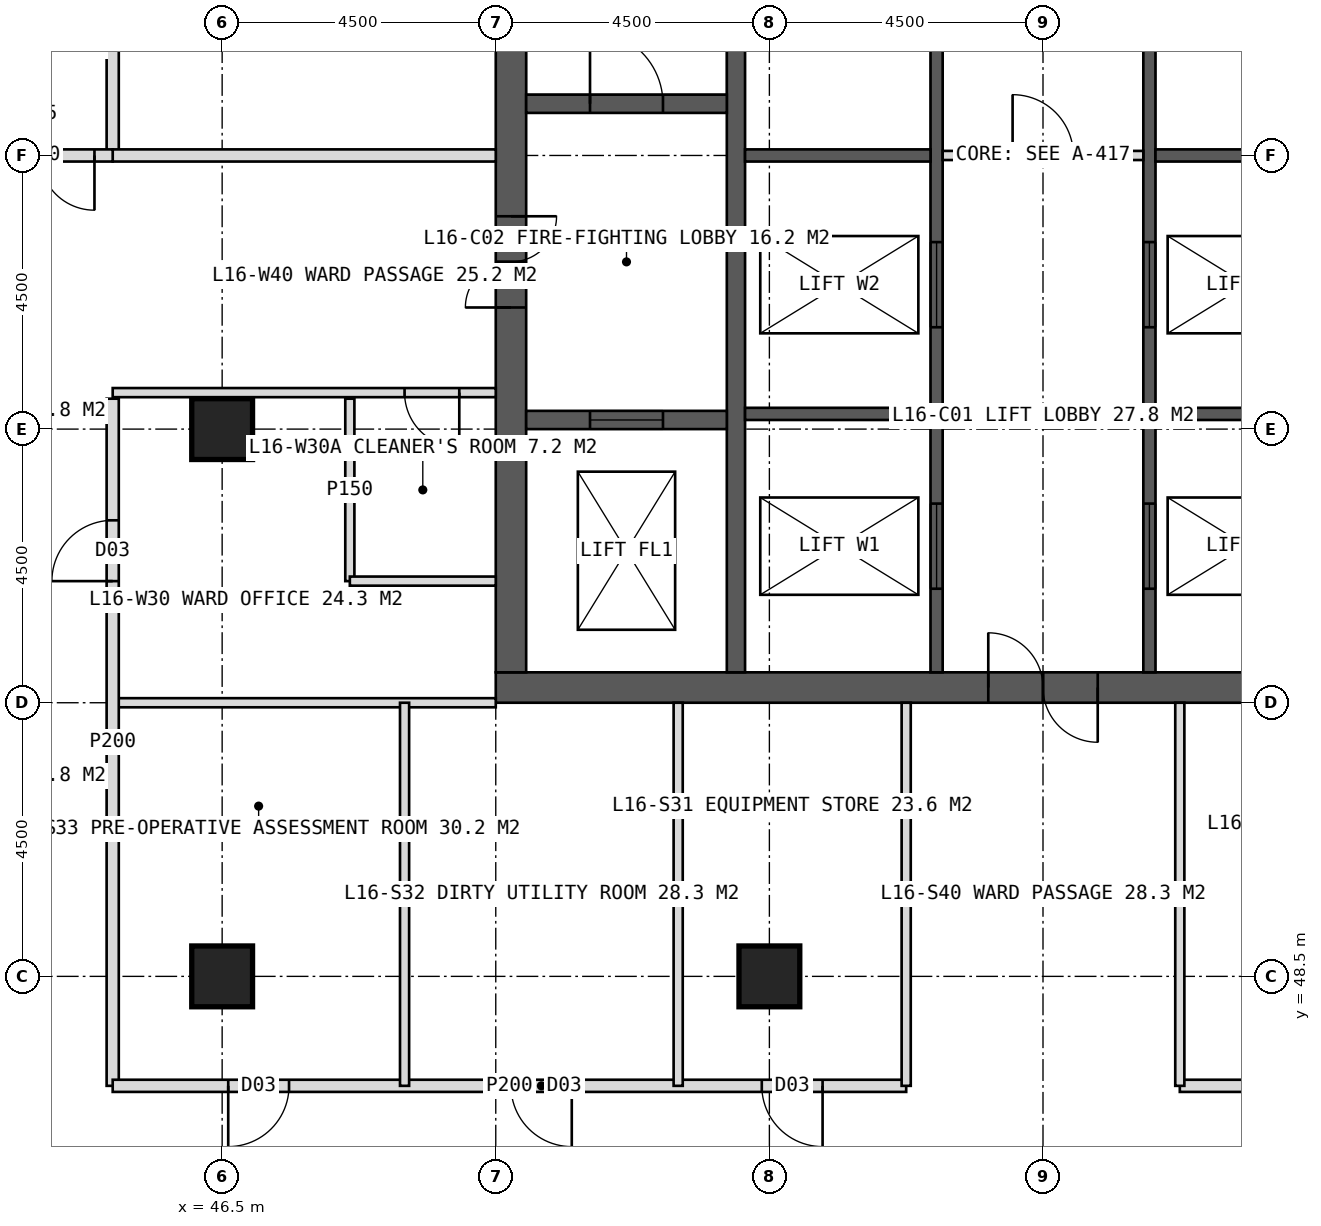
"""IFC4 building model, lengths in metres.
Left out: names, types, materials, properties, quantities, classifications, styles, units other than length and angle.
Written with IfcOpenShell. Run it as: python <this file> out.ifc"""

import sys

from ifc_helpers import new_model, si_unit, direction, frame, frame_2d, origin, origin_2d, place, context, subcontext, project, spatial, rectangle, hollow_rectangle, extrude, element, fill, save


model = new_model("IFC4")
c1 = context("Model", 3, precision=1e-05, world=origin(), true_north=direction((0.0, 1.0)))
c2 = subcontext(c1, "Body", "Model", "MODEL_VIEW")
j1 = project(units=[si_unit("LENGTHUNIT", "METRE"), si_unit("PLANEANGLEUNIT", "RADIAN")], contexts=[c1])
p1 = place(None, origin())
s1 = spatial("IfcSite", under=j1, at=p1, CompositionType="ELEMENT")
p2 = place(p1, origin())
s2 = spatial("IfcBuilding", under=s1, at=p2, CompositionType="ELEMENT")
p3 = place(p2, frame((0.0, 0.0, 71.0)))
s3 = spatial("IfcBuildingStorey", under=s2, at=p3, CompositionType="ELEMENT", Elevation=71.0)
p4 = place(p3, frame((51.0, 53.25, 0.0), z_axis=(0.0, 0.0, 1.0), x_axis=(1.0, 0.0, 0.0)))
e1 = element("IfcWall", 1, at=p4, inside=s3, PredefinedType="SHEAR", context=c2, shape_type="SweptSolid", body=[
    extrude(rectangle(XDim=18.0, YDim=0.5, at=frame_2d((9.0, 0.0))), origin(), (0.0, 0.0, 1.0), 4.0),
])
p5 = place(p4, frame((8.1, 0.0, 0.0)))
e2 = element("IfcOpeningElement", 2, at=p5, cuts=e1, PredefinedType="OPENING", context=c2, shape_type="SweptSolid", body=[
    extrude(rectangle(XDim=1.8, YDim=2.2, at=frame_2d((0.9, 1.1))), frame((0.0, 0.26, 0.0), z_axis=(0.0, -1.0, 0.0), x_axis=(1.0, 0.0, 0.0)), (0.0, 0.0, 1.0), 0.52),
])
p6 = place(p3, frame((51.25, 53.5, 0.0), z_axis=(0.0, 0.0, 1.0), x_axis=(0.0, 1.0, 0.0)))
e3 = element("IfcWall", 3, at=p6, inside=s3, PredefinedType="SHEAR", context=c2, shape_type="SweptSolid", body=[
    extrude(rectangle(XDim=17.0, YDim=0.5, at=frame_2d((8.5, 0.0))), origin(), (0.0, 0.0, 1.0), 4.0),
])
p7 = place(p6, frame((6.0, 0.0, 0.0)))
e4 = element("IfcOpeningElement", 4, at=p7, cuts=e3, PredefinedType="OPENING", context=c2, shape_type="SweptSolid", body=[
    extrude(rectangle(XDim=1.5, YDim=2.2, at=frame_2d((0.75, 1.1))), frame((0.0, 0.26, 0.0), z_axis=(0.0, -1.0, 0.0), x_axis=(1.0, 0.0, 0.0)), (0.0, 0.0, 1.0), 0.52),
])
p8 = place(p3, frame((54.95, 53.5, 0.0), z_axis=(0.0, 0.0, 1.0), x_axis=(0.0, 1.0, 0.0)))
e5 = element("IfcWall", 5, at=p8, inside=s3, PredefinedType="SHEAR", context=c2, shape_type="SweptSolid", body=[
    extrude(rectangle(XDim=17.0, YDim=0.3, at=frame_2d((8.5, 0.0))), origin(), (0.0, 0.0, 1.0), 4.0),
])
p9 = place(p3, frame((58.25, 53.5, 0.0), z_axis=(0.0, 0.0, 1.0), x_axis=(0.0, 1.0, 0.0)))
e6 = element("IfcWall", 6, at=p9, inside=s3, PredefinedType="SHEAR", context=c2, shape_type="SweptSolid", body=[
    extrude(rectangle(XDim=17.0, YDim=0.2, at=frame_2d((8.5, 0.0))), origin(), (0.0, 0.0, 1.0), 4.0),
])
p10 = place(p9, frame((1.375, 0.0, 0.0)))
e7 = element("IfcOpeningElement", 7, at=p10, cuts=e6, PredefinedType="OPENING", context=c2, shape_type="SweptSolid", body=[
    extrude(rectangle(XDim=1.4, YDim=2.2, at=frame_2d((0.7, 1.1))), frame((0.0, 0.11, 0.0), z_axis=(0.0, -1.0, 0.0), x_axis=(1.0, 0.0, 0.0)), (0.0, 0.0, 1.0), 0.22),
])
p11 = place(p9, frame((5.675, 0.0, 0.0)))
e8 = element("IfcOpeningElement", 8, at=p11, cuts=e6, PredefinedType="OPENING", context=c2, shape_type="SweptSolid", body=[
    extrude(rectangle(XDim=1.4, YDim=2.2, at=frame_2d((0.7, 1.1))), frame((0.0, 0.11, 0.0), z_axis=(0.0, -1.0, 0.0), x_axis=(1.0, 0.0, 0.0)), (0.0, 0.0, 1.0), 0.22),
])
p12 = place(p3, frame((61.75, 53.5, 0.0), z_axis=(0.0, 0.0, 1.0), x_axis=(0.0, 1.0, 0.0)))
e9 = element("IfcWall", 9, at=p12, inside=s3, PredefinedType="SHEAR", context=c2, shape_type="SweptSolid", body=[
    extrude(rectangle(XDim=17.0, YDim=0.2, at=frame_2d((8.5, 0.0))), origin(), (0.0, 0.0, 1.0), 4.0),
])
p13 = place(p12, frame((1.375, 0.0, 0.0)))
e10 = element("IfcOpeningElement", 10, at=p13, cuts=e9, PredefinedType="OPENING", context=c2, shape_type="SweptSolid", body=[
    extrude(rectangle(XDim=1.4, YDim=2.2, at=frame_2d((0.7, 1.1))), frame((0.0, 0.11, 0.0), z_axis=(0.0, -1.0, 0.0), x_axis=(1.0, 0.0, 0.0)), (0.0, 0.0, 1.0), 0.22),
])
p14 = place(p12, frame((5.675, 0.0, 0.0)))
e11 = element("IfcOpeningElement", 11, at=p14, cuts=e9, PredefinedType="OPENING", context=c2, shape_type="SweptSolid", body=[
    extrude(rectangle(XDim=1.4, YDim=2.2, at=frame_2d((0.7, 1.1))), frame((0.0, 0.11, 0.0), z_axis=(0.0, -1.0, 0.0), x_axis=(1.0, 0.0, 0.0)), (0.0, 0.0, 1.0), 0.22),
])
for number, where, z_axis, x_axis in (
    (12, (55.1, 57.75, 0.0), (0.0, 0.0, 1.0), (1.0, 0.0, 0.0)),
    (13, (61.85, 57.75, 0.0), (0.0, 0.0, 1.0), (1.0, 0.0, 0.0)),
    (14, (55.1, 62.0, 0.0), (0.0, 0.0, 1.0), (1.0, 0.0, 0.0)),
    (15, (61.85, 62.0, 0.0), (0.0, 0.0, 1.0), (1.0, 0.0, 0.0)),
):
    element("IfcWall", number, at=place(p3, frame(where, z_axis=z_axis, x_axis=x_axis)), inside=s3, PredefinedType="SHEAR", context=c2, shape_type="SweptSolid", body=[
        extrude(rectangle(XDim=3.05, YDim=0.2, at=frame_2d((1.525, 0.0))), origin(), (0.0, 0.0, 1.0), 4.0),
    ])
p15 = place(p3, frame((51.5, 62.85, 0.0), z_axis=(0.0, 0.0, 1.0), x_axis=(1.0, 0.0, 0.0)))
e16 = element("IfcWall", 16, at=p15, inside=s3, PredefinedType="SHEAR", context=c2, shape_type="SweptSolid", body=[
    extrude(rectangle(XDim=3.3, YDim=0.3, at=frame_2d((1.65, 0.0))), origin(), (0.0, 0.0, 1.0), 4.0),
])
p16 = place(p15, frame((1.05, 0.0, 0.0)))
e17 = element("IfcOpeningElement", 17, at=p16, cuts=e16, PredefinedType="OPENING", context=c2, shape_type="SweptSolid", body=[
    extrude(rectangle(XDim=1.2, YDim=2.1, at=frame_2d((0.6, 1.05))), frame((0.0, 0.16, 0.0), z_axis=(0.0, -1.0, 0.0), x_axis=(1.0, 0.0, 0.0)), (0.0, 0.0, 1.0), 0.32),
])
p17 = place(p3, frame((51.5, 57.65, 0.0), z_axis=(0.0, 0.0, 1.0), x_axis=(1.0, 0.0, 0.0)))
e18 = element("IfcWall", 18, at=p17, inside=s3, PredefinedType="SHEAR", context=c2, shape_type="SweptSolid", body=[
    extrude(rectangle(XDim=3.3, YDim=0.3, at=frame_2d((1.65, 0.0))), origin(), (0.0, 0.0, 1.0), 4.0),
])
p18 = place(p17, frame((1.05, 0.0, 0.0)))
e19 = element("IfcOpeningElement", 19, at=p18, cuts=e18, PredefinedType="OPENING", context=c2, shape_type="SweptSolid", body=[
    extrude(rectangle(XDim=1.2, YDim=2.2, at=frame_2d((0.6, 1.1))), frame((0.0, 0.16, 0.0), z_axis=(0.0, -1.0, 0.0), x_axis=(1.0, 0.0, 0.0)), (0.0, 0.0, 1.0), 0.32),
])
for number, where, z_axis, x_axis in (
    (20, (46.5, 48.5, 0.0), (0.0, 0.0, 1.0), (1.0, 0.0, 0.0)),
    (21, (55.5, 48.5, 0.0), (0.0, 0.0, 1.0), (1.0, 0.0, 0.0)),
    (22, (46.5, 57.5, 0.0), (0.0, 0.0, 1.0), (1.0, 0.0, 0.0)),
):
    element("IfcColumn", number, at=place(p3, frame(where, z_axis=z_axis, x_axis=x_axis)), inside=s3, PredefinedType="COLUMN", context=c2, shape_type="SweptSolid", body=[
        extrude(hollow_rectangle(XDim=1.0, YDim=1.0, WallThickness=0.1, at=origin_2d()), origin(), (0.0, 0.0, 1.0), 4.0),
    ])
p19 = place(p3, frame((51.0, 53.0, 0.0), z_axis=(0.0, 0.0, 1.0), x_axis=(-1.0, 0.0, 0.0)))
e23 = element("IfcWall", 23, at=p19, inside=s3, PredefinedType="PARTITIONING", context=c2, shape_type="SweptSolid", body=[
    extrude(rectangle(XDim=6.3, YDim=0.15, at=frame_2d((3.15, 0.0))), origin(), (0.0, 0.0, 1.0), 3.75),
])
p20 = place(p3, frame((44.7, 46.7, 0.0), z_axis=(0.0, 0.0, 1.0), x_axis=(0.0, 1.0, 0.0)))
e24 = element("IfcWall", 24, at=p20, inside=s3, PredefinedType="PARTITIONING", context=c2, shape_type="SweptSolid", body=[
    extrude(rectangle(XDim=11.3, YDim=0.2, at=frame_2d((5.65, 0.0))), origin(), (0.0, 0.0, 1.0), 3.75),
])
p21 = place(p20, frame((8.3, 0.0, 0.0)))
e25 = element("IfcOpeningElement", 25, at=p21, cuts=e24, PredefinedType="OPENING", context=c2, shape_type="SweptSolid", body=[
    extrude(rectangle(XDim=1.0, YDim=2.1, at=frame_2d((0.5, 1.05))), frame((0.0, 0.11, 0.0), z_axis=(0.0, -1.0, 0.0), x_axis=(1.0, 0.0, 0.0)), (0.0, 0.0, 1.0), 0.22),
])
p22 = place(p3, frame((44.7, 62.0, 0.0), z_axis=(0.0, 0.0, 1.0), x_axis=(0.0, 1.0, 0.0)))
e26 = element("IfcWall", 26, at=p22, inside=s3, PredefinedType="PARTITIONING", context=c2, shape_type="SweptSolid", body=[
    extrude(rectangle(XDim=15.3, YDim=0.2, at=frame_2d((7.65, 0.0))), origin(), (0.0, 0.0, 1.0), 3.75),
])
p23 = place(p22, frame((3.25, 0.0, 0.0)))
e27 = element("IfcOpeningElement", 27, at=p23, cuts=e26, PredefinedType="OPENING", context=c2, shape_type="SweptSolid", body=[
    extrude(rectangle(XDim=1.0, YDim=2.1, at=frame_2d((0.5, 1.05))), frame((0.0, 0.11, 0.0), z_axis=(0.0, -1.0, 0.0), x_axis=(1.0, 0.0, 0.0)), (0.0, 0.0, 1.0), 0.22),
])
p24 = place(p22, frame((9.25, 0.0, 0.0)))
e28 = element("IfcOpeningElement", 28, at=p24, cuts=e26, PredefinedType="OPENING", context=c2, shape_type="SweptSolid", body=[
    extrude(rectangle(XDim=1.0, YDim=2.1, at=frame_2d((0.5, 1.05))), frame((0.0, 0.11, 0.0), z_axis=(0.0, -1.0, 0.0), x_axis=(1.0, 0.0, 0.0)), (0.0, 0.0, 1.0), 0.22),
])
p25 = place(p22, frame((13.15, 0.0, 0.0)))
e29 = element("IfcOpeningElement", 29, at=p25, cuts=e26, PredefinedType="OPENING", context=c2, shape_type="SweptSolid", body=[
    extrude(rectangle(XDim=1.0, YDim=2.1, at=frame_2d((0.5, 1.05))), frame((0.0, 0.11, 0.0), z_axis=(0.0, -1.0, 0.0), x_axis=(1.0, 0.0, 0.0)), (0.0, 0.0, 1.0), 0.22),
])
p26 = place(p3, frame((51.0, 58.1, 0.0), z_axis=(0.0, 0.0, 1.0), x_axis=(-1.0, 0.0, 0.0)))
e30 = element("IfcWall", 30, at=p26, inside=s3, PredefinedType="PARTITIONING", context=c2, shape_type="SweptSolid", body=[
    extrude(rectangle(XDim=6.3, YDim=0.15, at=frame_2d((3.15, 0.0))), origin(), (0.0, 0.0, 1.0), 3.75),
])
p27 = place(p26, frame((0.6, 0.0, 0.0)))
e31 = element("IfcOpeningElement", 31, at=p27, cuts=e30, PredefinedType="OPENING", context=c2, shape_type="SweptSolid", body=[
    extrude(rectangle(XDim=0.9, YDim=2.1, at=frame_2d((0.45, 1.05))), frame((0.0, 0.085, 0.0), z_axis=(0.0, -1.0, 0.0), x_axis=(1.0, 0.0, 0.0)), (0.0, 0.0, 1.0), 0.17),
])
p28 = place(p3, frame((51.0, 62.0, 0.0), z_axis=(0.0, 0.0, 1.0), x_axis=(-1.0, 0.0, 0.0)))
e32 = element("IfcWall", 32, at=p28, inside=s3, PredefinedType="SOLIDWALL", context=c2, shape_type="SweptSolid", body=[
    extrude(rectangle(XDim=6.3, YDim=0.2, at=frame_2d((3.15, 0.0))), origin(), (0.0, 0.0, 1.0), 2.75),
])
p29 = place(p3, frame((48.6, 55.0, 0.0), z_axis=(0.0, 0.0, 1.0), x_axis=(0.0, 1.0, 0.0)))
e33 = element("IfcWall", 33, at=p29, inside=s3, PredefinedType="PARTITIONING", context=c2, shape_type="SweptSolid", body=[
    extrude(rectangle(XDim=3.0, YDim=0.15, at=frame_2d((1.5, 0.0))), origin(), (0.0, 0.0, 1.0), 3.75),
])
p30 = place(p3, frame((51.0, 55.0, 0.0), z_axis=(0.0, 0.0, 1.0), x_axis=(-1.0, 0.0, 0.0)))
e34 = element("IfcWall", 34, at=p30, inside=s3, PredefinedType="PARTITIONING", context=c2, shape_type="SweptSolid", body=[
    extrude(rectangle(XDim=2.4, YDim=0.15, at=frame_2d((1.2, 0.0))), origin(), (0.0, 0.0, 1.0), 3.75),
])
p31 = place(p3, frame((75.3, 46.7, 0.0), z_axis=(0.0, 0.0, 1.0), x_axis=(-1.0, 0.0, 0.0)))
e35 = element("IfcWall", 35, at=p31, inside=s3, PredefinedType="PARTITIONING", context=c2, shape_type="SweptSolid", body=[
    extrude(rectangle(XDim=13.05, YDim=0.2, at=frame_2d((6.525, 0.0))), origin(), (0.0, 0.0, 1.0), 3.75),
])
p32 = place(p31, frame((9.175, 0.0, 0.0)))
e36 = element("IfcOpeningElement", 36, at=p32, cuts=e35, PredefinedType="OPENING", context=c2, shape_type="SweptSolid", body=[
    extrude(rectangle(XDim=1.0, YDim=2.1, at=frame_2d((0.5, 1.05))), frame((0.0, 0.11, 0.0), z_axis=(0.0, -1.0, 0.0), x_axis=(1.0, 0.0, 0.0)), (0.0, 0.0, 1.0), 0.22),
])
p33 = place(p3, frame((57.75, 46.7, 0.0), z_axis=(0.0, 0.0, 1.0), x_axis=(-1.0, 0.0, 0.0)))
e37 = element("IfcWall", 37, at=p33, inside=s3, PredefinedType="PARTITIONING", context=c2, shape_type="SweptSolid", body=[
    extrude(rectangle(XDim=13.05, YDim=0.2, at=frame_2d((6.525, 0.0))), origin(), (0.0, 0.0, 1.0), 3.75),
])
p34 = place(p33, frame((1.375, 0.0, 0.0)))
e38 = element("IfcOpeningElement", 38, at=p34, cuts=e37, PredefinedType="OPENING", context=c2, shape_type="SweptSolid", body=[
    extrude(rectangle(XDim=1.0, YDim=2.1, at=frame_2d((0.5, 1.05))), frame((0.0, 0.11, 0.0), z_axis=(0.0, -1.0, 0.0), x_axis=(1.0, 0.0, 0.0)), (0.0, 0.0, 1.0), 0.22),
])
p35 = place(p33, frame((5.5, 0.0, 0.0)))
e39 = element("IfcOpeningElement", 39, at=p35, cuts=e37, PredefinedType="OPENING", context=c2, shape_type="SweptSolid", body=[
    extrude(rectangle(XDim=1.0, YDim=2.1, at=frame_2d((0.5, 1.05))), frame((0.0, 0.11, 0.0), z_axis=(0.0, -1.0, 0.0), x_axis=(1.0, 0.0, 0.0)), (0.0, 0.0, 1.0), 0.22),
])
p36 = place(p33, frame((10.15, 0.0, 0.0)))
e40 = element("IfcOpeningElement", 40, at=p36, cuts=e37, PredefinedType="OPENING", context=c2, shape_type="SweptSolid", body=[
    extrude(rectangle(XDim=1.0, YDim=2.1, at=frame_2d((0.5, 1.05))), frame((0.0, 0.11, 0.0), z_axis=(0.0, -1.0, 0.0), x_axis=(1.0, 0.0, 0.0)), (0.0, 0.0, 1.0), 0.22),
])
for number, where, z_axis, x_axis in (
    (41, (62.25, 53.0, 0.0), (0.0, 0.0, 1.0), (0.0, -1.0, 0.0)),
    (42, (57.75, 53.0, 0.0), (0.0, 0.0, 1.0), (0.0, -1.0, 0.0)),
    (43, (54.0, 53.0, 0.0), (0.0, 0.0, 1.0), (0.0, -1.0, 0.0)),
    (44, (49.5, 53.0, 0.0), (0.0, 0.0, 1.0), (0.0, -1.0, 0.0)),
):
    element("IfcWall", number, at=place(p3, frame(where, z_axis=z_axis, x_axis=x_axis)), inside=s3, PredefinedType="PARTITIONING", context=c2, shape_type="SweptSolid", body=[
        extrude(rectangle(XDim=6.3, YDim=0.15, at=frame_2d((3.15, 0.0))), origin(), (0.0, 0.0, 1.0), 3.75),
    ])
p37 = place(p3, frame((44.7, 62.0, 0.0), z_axis=(0.0, 0.0, 1.0), x_axis=(-1.0, 0.0, 0.0)))
e45 = element("IfcWall", 45, at=p37, inside=s3, PredefinedType="SOLIDWALL", context=c2, shape_type="SweptSolid", body=[
    extrude(rectangle(XDim=2.7, YDim=0.2, at=frame_2d((1.35, 0.0))), origin(), (0.0, 0.0, 1.0), 2.75),
])
p38 = place(p37, frame((0.3, 0.0, 0.0)))
e46 = element("IfcOpeningElement", 46, at=p38, cuts=e45, PredefinedType="OPENING", context=c2, shape_type="SweptSolid", body=[
    extrude(rectangle(XDim=1.8, YDim=2.2, at=frame_2d((0.9, 1.1))), frame((0.0, 0.11, 0.0), z_axis=(0.0, -1.0, 0.0), x_axis=(1.0, 0.0, 0.0)), (0.0, 0.0, 1.0), 0.22),
])
p39 = place(p3, frame((58.35, 62.0, 0.0), z_axis=(0.0, 0.0, 1.0), x_axis=(1.0, 0.0, 0.0)))
e47 = element("IfcWall", 47, at=p39, inside=s3, PredefinedType="PARTITIONING", context=c2, shape_type="SweptSolid", body=[
    extrude(rectangle(XDim=3.3, YDim=0.15, at=frame_2d((1.65, 0.0))), origin(), (0.0, 0.0, 1.0), 3.75),
])
p40 = place(p39, frame((1.15, 0.0, 0.0)))
e48 = element("IfcOpeningElement", 48, at=p40, cuts=e47, PredefinedType="OPENING", context=c2, shape_type="SweptSolid", body=[
    extrude(rectangle(XDim=1.0, YDim=2.1, at=frame_2d((0.5, 1.05))), frame((0.0, 0.085, 0.0), z_axis=(0.0, -1.0, 0.0), x_axis=(1.0, 0.0, 0.0)), (0.0, 0.0, 1.0), 0.17),
])
p41 = place(p27, origin())
e49 = element("IfcDoor", 49, at=p41, inside=s3, OperationType="SINGLE_SWING_LEFT", PredefinedType="DOOR", context=c2, shape_type="SweptSolid", body=[
    extrude(rectangle(XDim=0.9, YDim=2.1, at=frame_2d((0.45, 1.05))), frame((0.0, 0.025, 0.0), z_axis=(0.0, -1.0, 0.0), x_axis=(1.0, 0.0, 0.0)), (0.0, 0.0, 1.0), 0.05),
])
fill(e31, e49)
p42 = place(p21, origin())
e50 = element("IfcDoor", 50, at=p42, inside=s3, OperationType="SINGLE_SWING_LEFT", PredefinedType="DOOR", context=c2, shape_type="SweptSolid", body=[
    extrude(rectangle(XDim=1.0, YDim=2.1, at=frame_2d((0.5, 1.05))), frame((0.0, 0.025, 0.0), z_axis=(0.0, -1.0, 0.0), x_axis=(1.0, 0.0, 0.0)), (0.0, 0.0, 1.0), 0.05),
])
fill(e25, e50)
p43 = place(p34, origin())
e51 = element("IfcDoor", 51, at=p43, inside=s3, OperationType="SINGLE_SWING_LEFT", PredefinedType="DOOR", context=c2, shape_type="SweptSolid", body=[
    extrude(rectangle(XDim=1.0, YDim=2.1, at=frame_2d((0.5, 1.05))), frame((0.0, 0.025, 0.0), z_axis=(0.0, -1.0, 0.0), x_axis=(1.0, 0.0, 0.0)), (0.0, 0.0, 1.0), 0.05),
])
fill(e38, e51)
p44 = place(p35, origin())
e52 = element("IfcDoor", 52, at=p44, inside=s3, OperationType="SINGLE_SWING_LEFT", PredefinedType="DOOR", context=c2, shape_type="SweptSolid", body=[
    extrude(rectangle(XDim=1.0, YDim=2.1, at=frame_2d((0.5, 1.05))), frame((0.0, 0.025, 0.0), z_axis=(0.0, -1.0, 0.0), x_axis=(1.0, 0.0, 0.0)), (0.0, 0.0, 1.0), 0.05),
])
fill(e39, e52)
p45 = place(p36, origin())
e53 = element("IfcDoor", 53, at=p45, inside=s3, OperationType="SINGLE_SWING_RIGHT", PredefinedType="DOOR", context=c2, shape_type="SweptSolid", body=[
    extrude(rectangle(XDim=1.0, YDim=2.1, at=frame_2d((0.5, 1.05))), frame((0.0, 0.025, 0.0), z_axis=(0.0, -1.0, 0.0), x_axis=(1.0, 0.0, 0.0)), (0.0, 0.0, 1.0), 0.05),
])
fill(e40, e53)
p46 = place(p38, origin())
e54 = element("IfcDoor", 54, at=p46, inside=s3, OperationType="DOUBLE_DOOR_DOUBLE_SWING", PredefinedType="DOOR", context=c2, shape_type="SweptSolid", body=[
    extrude(rectangle(XDim=1.8, YDim=2.2, at=frame_2d((0.9, 1.1))), frame((0.0, 0.025, 0.0), z_axis=(0.0, -1.0, 0.0), x_axis=(1.0, 0.0, 0.0)), (0.0, 0.0, 1.0), 0.05),
])
fill(e46, e54)
p47 = place(p5, origin())
e55 = element("IfcDoor", 55, at=p47, inside=s3, OperationType="DOUBLE_DOOR_SINGLE_SWING", PredefinedType="DOOR", context=c2, shape_type="SweptSolid", body=[
    extrude(rectangle(XDim=1.8, YDim=2.2, at=frame_2d((0.9, 1.1))), frame((0.0, 0.025, 0.0), z_axis=(0.0, -1.0, 0.0), x_axis=(1.0, 0.0, 0.0)), (0.0, 0.0, 1.0), 0.05),
])
fill(e2, e55)
p48 = place(p7, origin())
e56 = element("IfcDoor", 56, at=p48, inside=s3, OperationType="DOUBLE_DOOR_SINGLE_SWING", PredefinedType="DOOR", context=c2, shape_type="SweptSolid", body=[
    extrude(rectangle(XDim=1.5, YDim=2.2, at=frame_2d((0.75, 1.1))), frame((0.0, 0.025, 0.0), z_axis=(0.0, -1.0, 0.0), x_axis=(1.0, 0.0, 0.0)), (0.0, 0.0, 1.0), 0.05),
])
fill(e4, e56)
p49 = place(p16, origin())
e57 = element("IfcDoor", 57, at=p49, inside=s3, OperationType="SINGLE_SWING_LEFT", PredefinedType="DOOR", context=c2, shape_type="SweptSolid", body=[
    extrude(rectangle(XDim=1.2, YDim=2.1, at=frame_2d((0.6, 1.05))), frame((0.0, 0.025, 0.0), z_axis=(0.0, -1.0, 0.0), x_axis=(1.0, 0.0, 0.0)), (0.0, 0.0, 1.0), 0.05),
])
fill(e17, e57)
p50 = place(p18, origin())
e58 = element("IfcDoor", 58, at=p50, inside=s3, OperationType="SLIDING_TO_LEFT", PredefinedType="DOOR", context=c2, shape_type="SweptSolid", body=[
    extrude(rectangle(XDim=1.2, YDim=2.2, at=frame_2d((0.6, 1.1))), frame((0.0, 0.025, 0.0), z_axis=(0.0, -1.0, 0.0), x_axis=(1.0, 0.0, 0.0)), (0.0, 0.0, 1.0), 0.05),
])
fill(e19, e58)
p51 = place(p10, origin())
e59 = element("IfcDoor", 59, at=p51, inside=s3, OperationType="SLIDING_TO_LEFT", PredefinedType="DOOR", context=c2, shape_type="SweptSolid", body=[
    extrude(rectangle(XDim=1.4, YDim=2.2, at=frame_2d((0.7, 1.1))), frame((0.0, 0.025, 0.0), z_axis=(0.0, -1.0, 0.0), x_axis=(1.0, 0.0, 0.0)), (0.0, 0.0, 1.0), 0.05),
])
fill(e7, e59)
p52 = place(p13, origin())
e60 = element("IfcDoor", 60, at=p52, inside=s3, OperationType="SLIDING_TO_LEFT", PredefinedType="DOOR", context=c2, shape_type="SweptSolid", body=[
    extrude(rectangle(XDim=1.4, YDim=2.2, at=frame_2d((0.7, 1.1))), frame((0.0, 0.025, 0.0), z_axis=(0.0, -1.0, 0.0), x_axis=(1.0, 0.0, 0.0)), (0.0, 0.0, 1.0), 0.05),
])
fill(e10, e60)
p53 = place(p11, origin())
e61 = element("IfcDoor", 61, at=p53, inside=s3, OperationType="SLIDING_TO_LEFT", PredefinedType="DOOR", context=c2, shape_type="SweptSolid", body=[
    extrude(rectangle(XDim=1.4, YDim=2.2, at=frame_2d((0.7, 1.1))), frame((0.0, 0.025, 0.0), z_axis=(0.0, -1.0, 0.0), x_axis=(1.0, 0.0, 0.0)), (0.0, 0.0, 1.0), 0.05),
])
fill(e8, e61)
p54 = place(p14, origin())
e62 = element("IfcDoor", 62, at=p54, inside=s3, OperationType="SLIDING_TO_LEFT", PredefinedType="DOOR", context=c2, shape_type="SweptSolid", body=[
    extrude(rectangle(XDim=1.4, YDim=2.2, at=frame_2d((0.7, 1.1))), frame((0.0, 0.025, 0.0), z_axis=(0.0, -1.0, 0.0), x_axis=(1.0, 0.0, 0.0)), (0.0, 0.0, 1.0), 0.05),
])
fill(e11, e62)
p55 = place(p40, origin())
e63 = element("IfcDoor", 63, at=p55, inside=s3, OperationType="SINGLE_SWING_LEFT", PredefinedType="DOOR", context=c2, shape_type="SweptSolid", body=[
    extrude(rectangle(XDim=1.0, YDim=2.1, at=frame_2d((0.5, 1.05))), frame((0.0, 0.025, 0.0), z_axis=(0.0, -1.0, 0.0), x_axis=(1.0, 0.0, 0.0)), (0.0, 0.0, 1.0), 0.05),
])
fill(e48, e63)
save(model, sys.argv[1])
